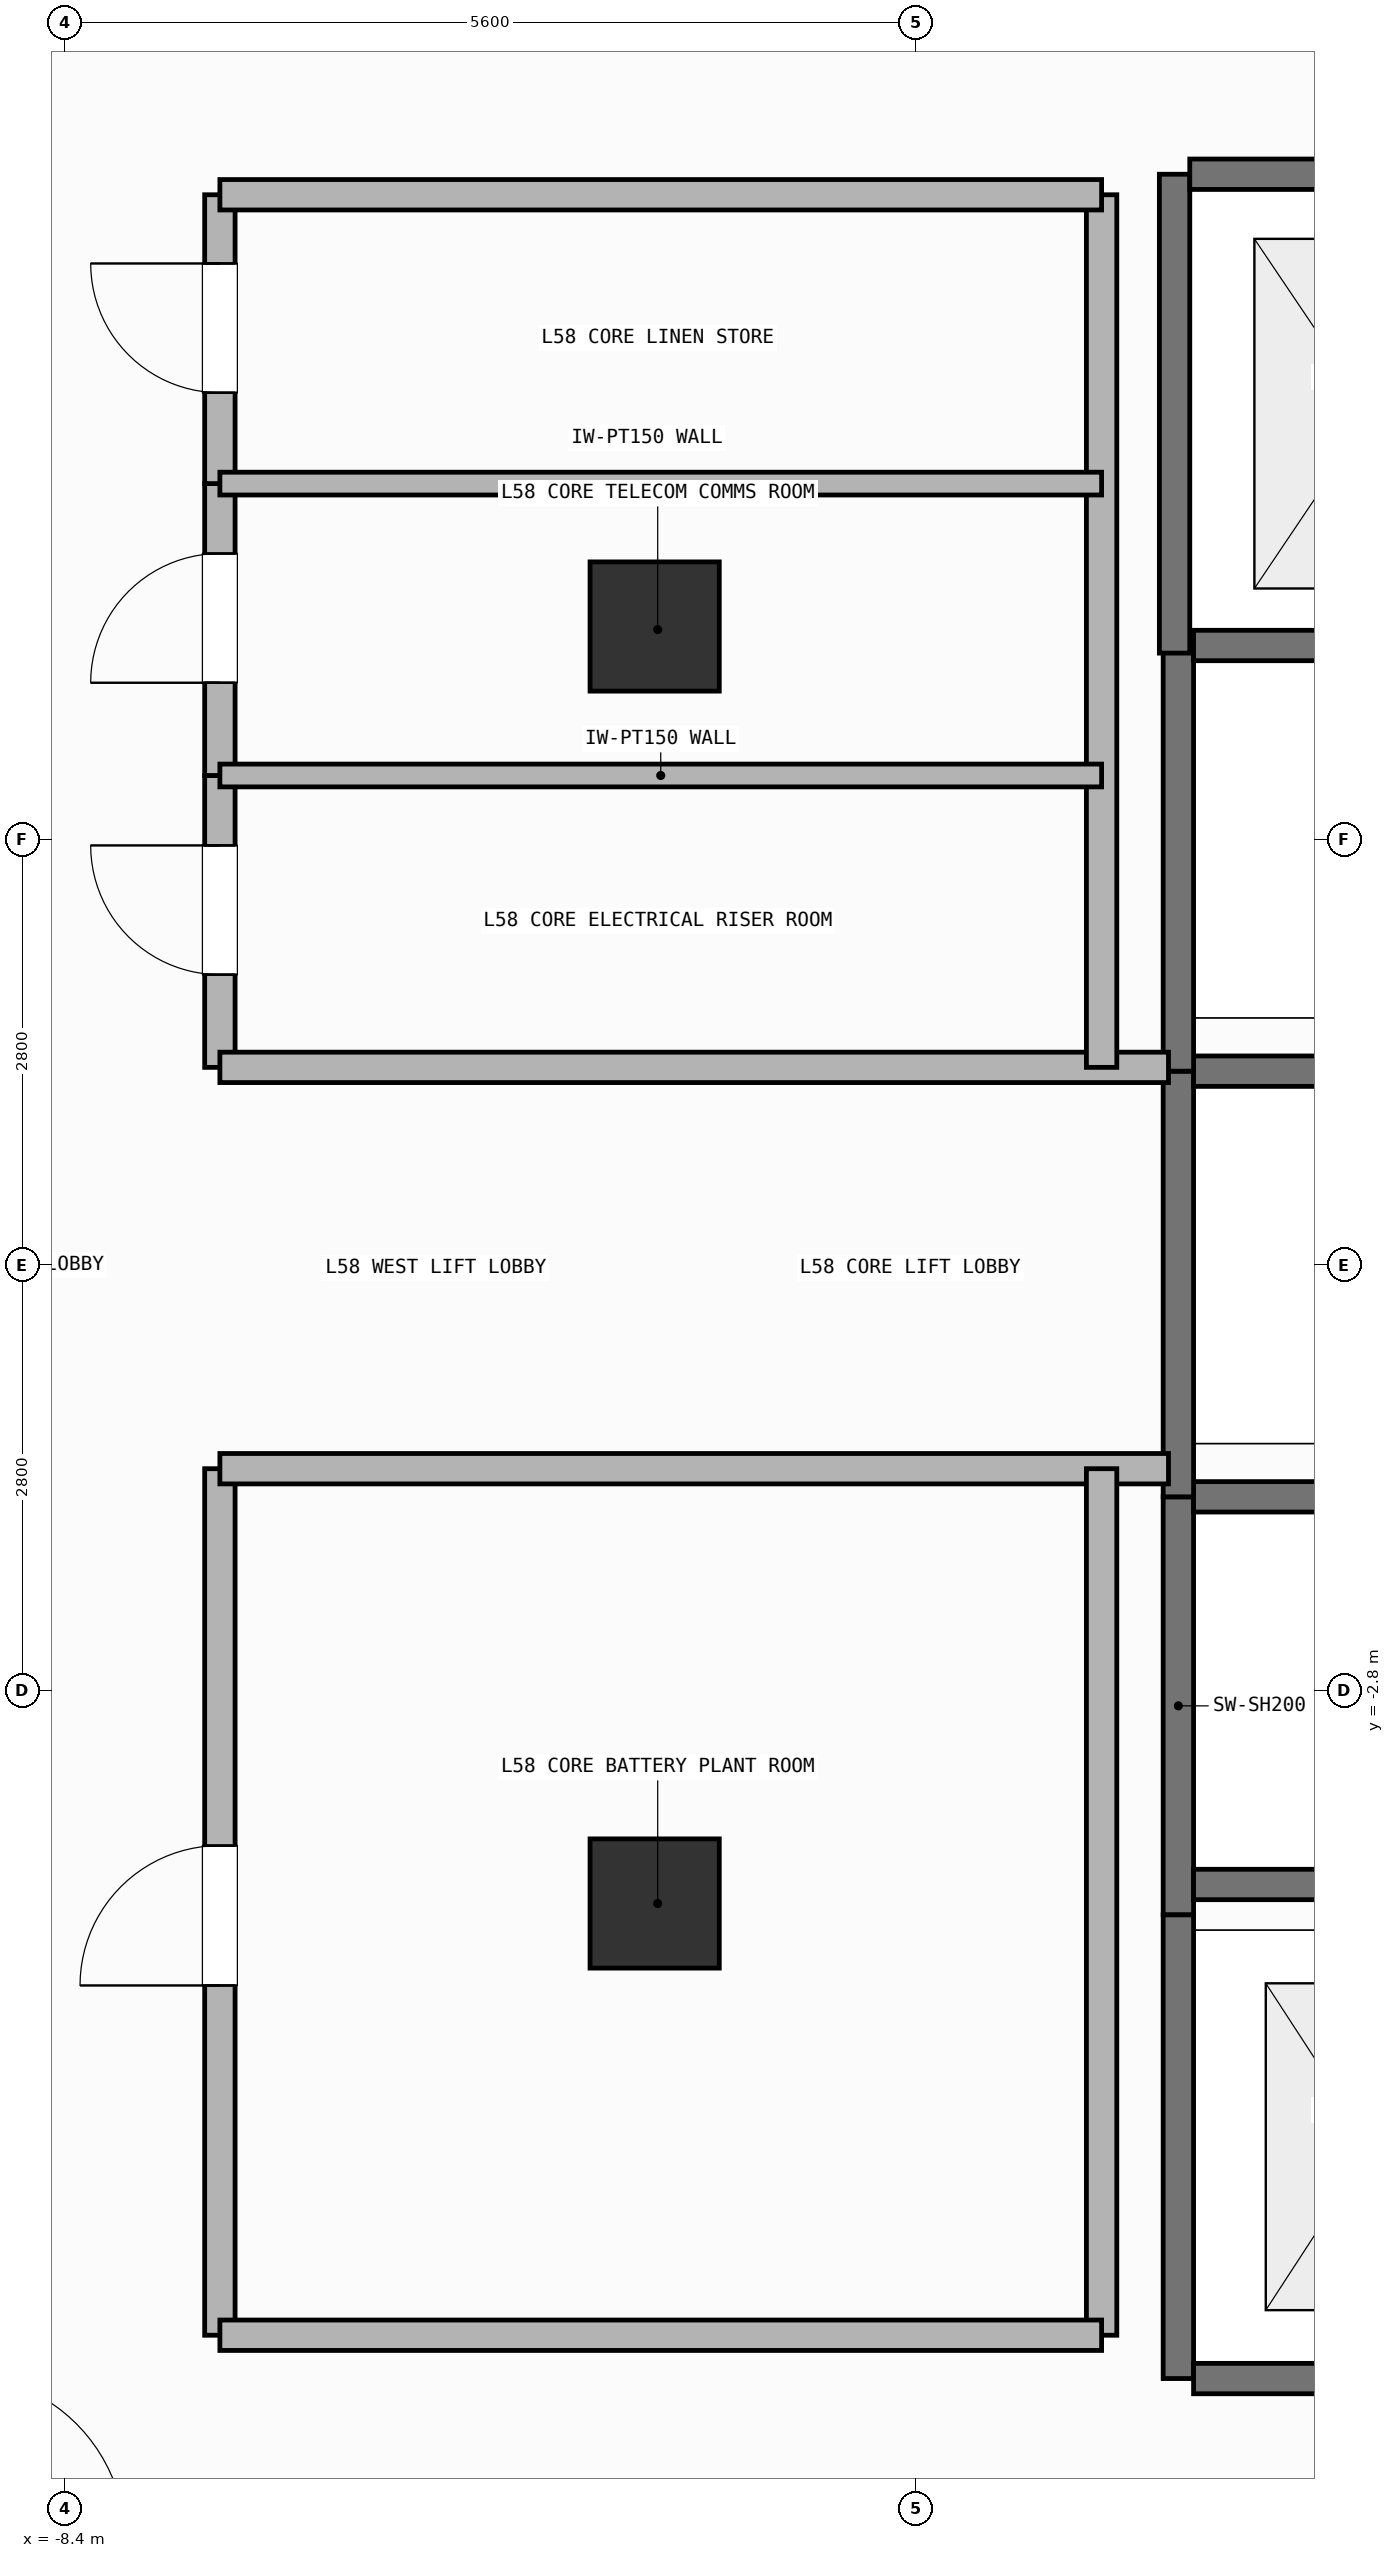
"""IFC4 building model, lengths in metres.
Left out: names, types, materials, properties, quantities, classifications, styles, units other than length and angle.
Written with IfcOpenShell. Run it as: python <this file> out.ifc"""

import sys

from ifc_helpers import new_model, si_unit, direction, frame, frame_2d, origin, origin_2d, place, context, subcontext, project, spatial, rectangle, extrude, element, fill, save


model = new_model("IFC4")
c1 = context("Model", 3, precision=1e-05, world=origin(), true_north=direction((0.0, 1.0)))
c2 = subcontext(c1, "Body", "Model", "MODEL_VIEW")
j1 = project(units=[si_unit("LENGTHUNIT", "METRE"), si_unit("PLANEANGLEUNIT", "RADIAN")], contexts=[c1])
p1 = place(None, origin())
s1 = spatial("IfcSite", under=j1, at=p1, CompositionType="ELEMENT")
p2 = place(p1, origin())
s2 = spatial("IfcBuilding", under=s1, at=p2, CompositionType="ELEMENT")
p3 = place(p2, frame((0.0, 0.0, 235.2)))
s3 = spatial("IfcBuildingStorey", under=s2, at=p3, CompositionType="ELEMENT", Elevation=235.2)
for number, where, z_axis, x_axis in (
    (1, (-4.52, -4.2, 0.0), (0.0, 0.0, 1.0), (1.0, 0.0, 0.0)),
    (2, (-4.52, 4.2, 0.0), (0.0, 0.0, 1.0), (1.0, 0.0, 0.0)),
):
    element("IfcColumn", number, at=place(p3, frame(where, z_axis=z_axis, x_axis=x_axis)), inside=s3, PredefinedType="COLUMN", context=c2, shape_type="SweptSolid", body=[
        extrude(rectangle(XDim=0.85, YDim=0.85, at=origin_2d()), origin(), (0.0, 0.0, 1.0), 7.8),
    ])
p4 = place(p3, frame((-1.075, -4.275, 0.0), z_axis=(0.0, 0.0, 1.0), x_axis=(0.0, 1.0, 0.0)))
e3 = element("IfcWall", 3, at=p4, inside=s3, PredefinedType="SHEAR", context=c2, shape_type="SweptSolid", body=[
    extrude(rectangle(XDim=2.75, YDim=0.2, at=frame_2d((1.375, 0.0))), origin(), (0.0, 0.0, 1.0), 7.58),
])
for number, where, z_axis, x_axis in (
    (4, (-0.975, -4.075, 0.0), (0.0, 0.0, 1.0), (1.0, 0.0, 0.0)),
    (5, (-0.975, -1.525, 0.0), (0.0, 0.0, 1.0), (1.0, 0.0, 0.0)),
):
    element("IfcWall", number, at=place(p3, frame(where, z_axis=z_axis, x_axis=x_axis)), inside=s3, PredefinedType="SHEAR", context=c2, shape_type="SweptSolid", body=[
        extrude(rectangle(XDim=2.35, YDim=0.2, at=frame_2d((1.175, 0.0))), origin(), (0.0, 0.0, 1.0), 7.58),
    ])
p5 = place(p3, frame((-1.075, -1.525, 0.0), z_axis=(0.0, 0.0, 1.0), x_axis=(0.0, 1.0, 0.0)))
e6 = element("IfcWall", 6, at=p5, inside=s3, PredefinedType="SHEAR", context=c2, shape_type="SweptSolid", body=[
    extrude(rectangle(XDim=2.8, YDim=0.2, at=frame_2d((1.4, 0.0))), origin(), (0.0, 0.0, 1.0), 7.58),
])
p6 = place(p3, frame((-0.975, 1.275, 0.0), z_axis=(0.0, 0.0, 1.0), x_axis=(1.0, 0.0, 0.0)))
e7 = element("IfcWall", 7, at=p6, inside=s3, PredefinedType="SHEAR", context=c2, shape_type="SweptSolid", body=[
    extrude(rectangle(XDim=2.35, YDim=0.2, at=frame_2d((1.175, 0.0))), origin(), (0.0, 0.0, 1.0), 7.58),
])
p7 = place(p3, frame((-1.075, 1.275, 0.0), z_axis=(0.0, 0.0, 1.0), x_axis=(0.0, 1.0, 0.0)))
e8 = element("IfcWall", 8, at=p7, inside=s3, PredefinedType="SHEAR", context=c2, shape_type="SweptSolid", body=[
    extrude(rectangle(XDim=2.8, YDim=0.2, at=frame_2d((1.4, 0.0))), origin(), (0.0, 0.0, 1.0), 7.58),
])
p8 = place(p3, frame((-0.975, 4.075, 0.0), z_axis=(0.0, 0.0, 1.0), x_axis=(1.0, 0.0, 0.0)))
e9 = element("IfcWall", 9, at=p8, inside=s3, PredefinedType="SHEAR", context=c2, shape_type="SweptSolid", body=[
    extrude(rectangle(XDim=2.35, YDim=0.2, at=frame_2d((1.175, 0.0))), origin(), (0.0, 0.0, 1.0), 7.58),
])
p9 = place(p3, frame((-1.1, 4.025, 0.0), z_axis=(0.0, 0.0, 1.0), x_axis=(0.0, 1.0, 0.0)))
e10 = element("IfcWall", 10, at=p9, inside=s3, PredefinedType="SHEAR", context=c2, shape_type="SweptSolid", body=[
    extrude(rectangle(XDim=3.15, YDim=0.2, at=frame_2d((1.575, 0.0))), origin(), (0.0, 0.0, 1.0), 7.58),
])
p10 = place(p3, frame((-1.0, 7.175, 0.0), z_axis=(0.0, 0.0, 1.0), x_axis=(1.0, 0.0, 0.0)))
e11 = element("IfcWall", 11, at=p10, inside=s3, PredefinedType="SHEAR", context=c2, shape_type="SweptSolid", body=[
    extrude(rectangle(XDim=2.4, YDim=0.2, at=frame_2d((1.2, 0.0))), origin(), (0.0, 0.0, 1.0), 7.58),
])
p11 = place(p3, frame((-1.075, -7.325, 0.0), z_axis=(0.0, 0.0, 1.0), x_axis=(0.0, 1.0, 0.0)))
e12 = element("IfcWall", 12, at=p11, inside=s3, PredefinedType="SHEAR", context=c2, shape_type="SweptSolid", body=[
    extrude(rectangle(XDim=3.05, YDim=0.2, at=frame_2d((1.525, 0.0))), origin(), (0.0, 0.0, 1.0), 7.58),
])
p12 = place(p3, frame((-0.975, -7.325, 0.0), z_axis=(0.0, 0.0, 1.0), x_axis=(1.0, 0.0, 0.0)))
e13 = element("IfcWall", 13, at=p12, inside=s3, PredefinedType="SHEAR", context=c2, shape_type="SweptSolid", body=[
    extrude(rectangle(XDim=2.35, YDim=0.2, at=frame_2d((1.175, 0.0))), origin(), (0.0, 0.0, 1.0), 7.58),
])
p13 = place(p3, frame((-7.38, -7.04, 0.0), z_axis=(0.0, 0.0, 1.0), x_axis=(0.0, 1.0, 0.0)))
e14 = element("IfcWall", 14, at=p13, inside=s3, PredefinedType="SOLIDWALL", context=c2, shape_type="SweptSolid", body=[
    extrude(rectangle(XDim=5.7, YDim=0.2, at=frame_2d((2.85, 0.0))), origin(), (0.0, 0.0, 1.0), 7.58),
])
p14 = place(p13, frame((2.301, 0.0, 0.0)))
e15 = element("IfcOpeningElement", 15, at=p14, cuts=e14, PredefinedType="OPENING", context=c2, shape_type="SweptSolid", body=[
    extrude(rectangle(XDim=0.92, YDim=2.1, at=frame_2d((0.46, 1.05))), frame((0.0, 0.11, 0.0), z_axis=(0.0, -1.0, 0.0), x_axis=(1.0, 0.0, 0.0)), (0.0, 0.0, 1.0), 0.22),
])
p15 = place(p3, frame((-7.38, 1.3, 0.0), z_axis=(0.0, 0.0, 1.0), x_axis=(0.0, 1.0, 0.0)))
e16 = element("IfcWall", 16, at=p15, inside=s3, PredefinedType="SOLIDWALL", context=c2, shape_type="SweptSolid", body=[
    extrude(rectangle(XDim=1.92, YDim=0.2, at=frame_2d((0.96, 0.0))), origin(), (0.0, 0.0, 1.0), 7.58),
])
p16 = place(p15, frame((0.61, 0.0, 0.0)))
e17 = element("IfcOpeningElement", 17, at=p16, cuts=e16, PredefinedType="OPENING", context=c2, shape_type="SweptSolid", body=[
    extrude(rectangle(XDim=0.85, YDim=2.1, at=frame_2d((0.425, 1.05))), frame((0.0, 0.11, 0.0), z_axis=(0.0, -1.0, 0.0), x_axis=(1.0, 0.0, 0.0)), (0.0, 0.0, 1.0), 0.22),
])
p17 = place(p3, frame((-7.38, 3.22, 0.0), z_axis=(0.0, 0.0, 1.0), x_axis=(0.0, 1.0, 0.0)))
e18 = element("IfcWall", 18, at=p17, inside=s3, PredefinedType="SOLIDWALL", context=c2, shape_type="SweptSolid", body=[
    extrude(rectangle(XDim=1.92, YDim=0.2, at=frame_2d((0.96, 0.0))), origin(), (0.0, 0.0, 1.0), 7.58),
])
p18 = place(p17, frame((0.61, 0.0, 0.0)))
e19 = element("IfcOpeningElement", 19, at=p18, cuts=e18, PredefinedType="OPENING", context=c2, shape_type="SweptSolid", body=[
    extrude(rectangle(XDim=0.85, YDim=2.1, at=frame_2d((0.425, 1.05))), frame((0.0, 0.11, 0.0), z_axis=(0.0, -1.0, 0.0), x_axis=(1.0, 0.0, 0.0)), (0.0, 0.0, 1.0), 0.22),
])
p19 = place(p3, frame((-7.38, 5.14, 0.0), z_axis=(0.0, 0.0, 1.0), x_axis=(0.0, 1.0, 0.0)))
e20 = element("IfcWall", 20, at=p19, inside=s3, PredefinedType="SOLIDWALL", context=c2, shape_type="SweptSolid", body=[
    extrude(rectangle(XDim=1.9, YDim=0.2, at=frame_2d((0.95, 0.0))), origin(), (0.0, 0.0, 1.0), 7.58),
])
p20 = place(p19, frame((0.598, 0.0, 0.0)))
e21 = element("IfcOpeningElement", 21, at=p20, cuts=e20, PredefinedType="OPENING", context=c2, shape_type="SweptSolid", body=[
    extrude(rectangle(XDim=0.85, YDim=2.1, at=frame_2d((0.425, 1.05))), frame((0.0, 0.11, 0.0), z_axis=(0.0, -1.0, 0.0), x_axis=(1.0, 0.0, 0.0)), (0.0, 0.0, 1.0), 0.22),
])
for number, where, z_axis, x_axis in (
    (22, (-7.38, -1.34, 0.0), (0.0, 0.0, 1.0), (1.0, 0.0, 0.0)),
    (23, (-7.38, 1.3, 0.0), (0.0, 0.0, 1.0), (1.0, 0.0, 0.0)),
):
    element("IfcWall", number, at=place(p3, frame(where, z_axis=z_axis, x_axis=x_axis)), inside=s3, PredefinedType="SOLIDWALL", context=c2, shape_type="SweptSolid", body=[
        extrude(rectangle(XDim=6.24, YDim=0.2, at=frame_2d((3.12, 0.0))), origin(), (0.0, 0.0, 1.0), 7.58),
    ])
p21 = place(p3, frame((-1.58, -7.04, 0.0), z_axis=(0.0, 0.0, 1.0), x_axis=(0.0, 1.0, 0.0)))
e24 = element("IfcWall", 24, at=p21, inside=s3, PredefinedType="SOLIDWALL", context=c2, shape_type="SweptSolid", body=[
    extrude(rectangle(XDim=5.7, YDim=0.2, at=frame_2d((2.85, 0.0))), origin(), (0.0, 0.0, 1.0), 7.58),
])
p22 = place(p3, frame((-7.38, -7.04, 0.0), z_axis=(0.0, 0.0, 1.0), x_axis=(1.0, 0.0, 0.0)))
e25 = element("IfcWall", 25, at=p22, inside=s3, PredefinedType="SOLIDWALL", context=c2, shape_type="SweptSolid", body=[
    extrude(rectangle(XDim=5.8, YDim=0.2, at=frame_2d((2.9, 0.0))), origin(), (0.0, 0.0, 1.0), 7.58),
])
p23 = place(p3, frame((-1.58, 1.3, 0.0), z_axis=(0.0, 0.0, 1.0), x_axis=(0.0, 1.0, 0.0)))
e26 = element("IfcWall", 26, at=p23, inside=s3, PredefinedType="SOLIDWALL", context=c2, shape_type="SweptSolid", body=[
    extrude(rectangle(XDim=5.74, YDim=0.2, at=frame_2d((2.87, 0.0))), origin(), (0.0, 0.0, 1.0), 7.58),
])
p24 = place(p3, frame((-7.38, 7.04, 0.0), z_axis=(0.0, 0.0, 1.0), x_axis=(1.0, 0.0, 0.0)))
e27 = element("IfcWall", 27, at=p24, inside=s3, PredefinedType="SOLIDWALL", context=c2, shape_type="SweptSolid", body=[
    extrude(rectangle(XDim=5.8, YDim=0.2, at=frame_2d((2.9, 0.0))), origin(), (0.0, 0.0, 1.0), 7.58),
])
for number, where, z_axis, x_axis in (
    (28, (-7.38, 3.22, 0.0), (0.0, 0.0, 1.0), (1.0, 0.0, 0.0)),
    (29, (-7.38, 5.14, 0.0), (0.0, 0.0, 1.0), (1.0, 0.0, 0.0)),
):
    element("IfcWall", number, at=place(p3, frame(where, z_axis=z_axis, x_axis=x_axis)), inside=s3, PredefinedType="PARTITIONING", context=c2, shape_type="SweptSolid", body=[
        extrude(rectangle(XDim=5.8, YDim=0.15, at=frame_2d((2.9, 0.0))), origin(), (0.0, 0.0, 1.0), 7.58),
    ])
p25 = place(p14, origin())
e30 = element("IfcDoor", 30, at=p25, inside=s3, OperationType="SINGLE_SWING_LEFT", PredefinedType="DOOR", context=c2, shape_type="SweptSolid", body=[
    extrude(rectangle(XDim=0.92, YDim=2.1, at=frame_2d((0.46, 1.05))), frame((0.0, 0.025, 0.0), z_axis=(0.0, -1.0, 0.0), x_axis=(1.0, 0.0, 0.0)), (0.0, 0.0, 1.0), 0.05),
])
fill(e15, e30)
p26 = place(p16, origin())
e31 = element("IfcDoor", 31, at=p26, inside=s3, OperationType="SINGLE_SWING_RIGHT", PredefinedType="DOOR", context=c2, shape_type="SweptSolid", body=[
    extrude(rectangle(XDim=0.85, YDim=2.1, at=frame_2d((0.425, 1.05))), frame((0.0, 0.025, 0.0), z_axis=(0.0, -1.0, 0.0), x_axis=(1.0, 0.0, 0.0)), (0.0, 0.0, 1.0), 0.05),
])
fill(e17, e31)
p27 = place(p18, origin())
e32 = element("IfcDoor", 32, at=p27, inside=s3, OperationType="SINGLE_SWING_LEFT", PredefinedType="DOOR", context=c2, shape_type="SweptSolid", body=[
    extrude(rectangle(XDim=0.85, YDim=2.1, at=frame_2d((0.425, 1.05))), frame((0.0, 0.025, 0.0), z_axis=(0.0, -1.0, 0.0), x_axis=(1.0, 0.0, 0.0)), (0.0, 0.0, 1.0), 0.05),
])
fill(e19, e32)
p28 = place(p20, origin())
e33 = element("IfcDoor", 33, at=p28, inside=s3, OperationType="SINGLE_SWING_RIGHT", PredefinedType="DOOR", context=c2, shape_type="SweptSolid", body=[
    extrude(rectangle(XDim=0.85, YDim=2.1, at=frame_2d((0.425, 1.05))), frame((0.0, 0.025, 0.0), z_axis=(0.0, -1.0, 0.0), x_axis=(1.0, 0.0, 0.0)), (0.0, 0.0, 1.0), 0.05),
])
fill(e21, e33)
save(model, sys.argv[1])
